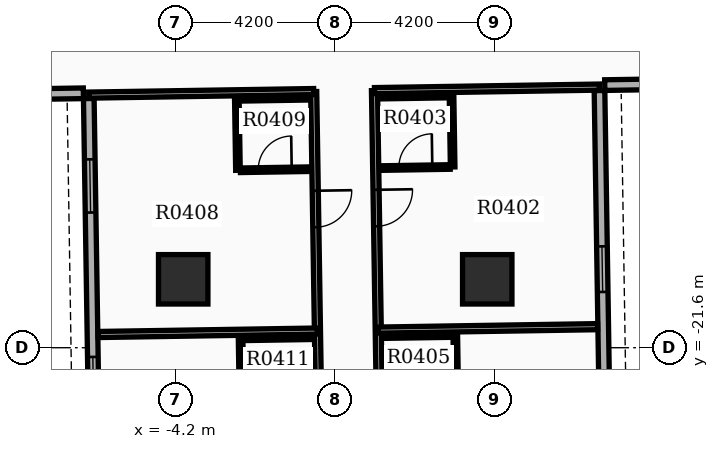
"""IFC4 building model, lengths in metres.
Left out: names, types, materials, properties, quantities, classifications, styles, units other than length and angle.
Written with IfcOpenShell. Run it as: python <this file> out.ifc"""

import sys

from ifc_helpers import new_model, si_unit, direction, frame, frame_2d, origin, origin_2d, place, context, subcontext, project, spatial, rectangle, extrude, element, fill, save


model = new_model("IFC4")
c1 = context("Model", 3, precision=1e-05, world=origin(), true_north=direction((0.0, 1.0)))
c2 = subcontext(c1, "Body", "Model", "MODEL_VIEW")
j1 = project(units=[si_unit("LENGTHUNIT", "METRE"), si_unit("PLANEANGLEUNIT", "RADIAN")], contexts=[c1])
p1 = place(None, origin())
s1 = spatial("IfcSite", under=j1, at=p1, CompositionType="ELEMENT")
p2 = place(p1, origin())
s2 = spatial("IfcBuilding", under=s1, at=p2, CompositionType="ELEMENT")
p3 = place(p2, frame((0.0, 0.0, 27.6)))
s3 = spatial("IfcBuildingStorey", under=s2, at=p3, CompositionType="ELEMENT", Elevation=27.6)
for number, where, z_axis, x_axis in (
    (1, (-4.0, -19.8, 0.0), (0.0, 0.0, 1.0), (1.0, 0.0, 0.0)),
    (2, (4.0, -19.8, 0.0), (0.0, 0.0, 1.0), (1.0, 0.0, 0.0)),
):
    element("IfcColumn", number, at=place(p3, frame(where, z_axis=z_axis, x_axis=x_axis)), inside=s3, PredefinedType="COLUMN", context=c2, shape_type="SweptSolid", body=[
        extrude(rectangle(XDim=1.3, YDim=1.3, at=origin_2d()), origin(), (0.0, 0.0, 1.0), 3.9),
    ])
p4 = place(p3, frame((-6.485, -15.044, 0.0), z_axis=(0.0, 0.0, 1.0), x_axis=(0.01571739401, -0.999876474133, 0.0)))
e3 = element("IfcWall", 3, at=p4, inside=s3, PredefinedType="STANDARD", context=c2, shape_type="SweptSolid", body=[
    extrude(rectangle(XDim=20.1, YDim=0.28, at=frame_2d((10.05, 0.0))), origin(), (0.0, 0.0, 1.0), 2.91),
])
p5 = place(p4, frame((1.6, 0.0, 0.8)))
e4 = element("IfcOpeningElement", 4, at=p5, cuts=e3, PredefinedType="OPENING", context=c2, shape_type="SweptSolid", body=[
    extrude(rectangle(XDim=1.4, YDim=1.6, at=frame_2d((0.7, 0.8))), frame((0.0, 0.15, 0.0), z_axis=(0.0, -1.0, 0.0), x_axis=(1.0, 0.0, 0.0)), (0.0, 0.0, 1.0), 0.3),
])
p6 = place(p4, frame((6.8, 0.0, 0.8)))
e5 = element("IfcOpeningElement", 5, at=p6, cuts=e3, PredefinedType="OPENING", context=c2, shape_type="SweptSolid", body=[
    extrude(rectangle(XDim=1.4, YDim=1.6, at=frame_2d((0.7, 0.8))), frame((0.0, 0.15, 0.0), z_axis=(0.0, -1.0, 0.0), x_axis=(1.0, 0.0, 0.0)), (0.0, 0.0, 1.0), 0.3),
])
p7 = place(p4, frame((10.0, 0.0, 0.8)))
e6 = element("IfcOpeningElement", 6, at=p7, cuts=e3, PredefinedType="OPENING", context=c2, shape_type="SweptSolid", body=[
    extrude(rectangle(XDim=1.4, YDim=1.6, at=frame_2d((0.7, 0.8))), frame((0.0, 0.15, 0.0), z_axis=(0.0, -1.0, 0.0), x_axis=(1.0, 0.0, 0.0)), (0.0, 0.0, 1.0), 0.3),
])
p8 = place(p4, frame((13.95, 0.0, 0.8)))
e7 = element("IfcOpeningElement", 7, at=p8, cuts=e3, PredefinedType="OPENING", context=c2, shape_type="SweptSolid", body=[
    extrude(rectangle(XDim=1.4, YDim=1.6, at=frame_2d((0.7, 0.8))), frame((0.0, 0.15, 0.0), z_axis=(0.0, -1.0, 0.0), x_axis=(1.0, 0.0, 0.0)), (0.0, 0.0, 1.0), 0.3),
])
p9 = place(p3, frame((7.27, -34.93, 0.0), z_axis=(0.0, 0.0, 1.0), x_axis=(-0.015705059908, 0.999876667941, 0.0)))
e8 = element("IfcWall", 8, at=p9, inside=s3, PredefinedType="STANDARD", context=c2, shape_type="SweptSolid", body=[
    extrude(rectangle(XDim=20.1, YDim=0.28, at=frame_2d((10.05, 0.0))), origin(), (0.0, 0.0, 1.0), 2.91),
])
p10 = place(p9, frame((1.6, 0.0, 0.8)))
e9 = element("IfcOpeningElement", 9, at=p10, cuts=e8, PredefinedType="OPENING", context=c2, shape_type="SweptSolid", body=[
    extrude(rectangle(XDim=1.4, YDim=1.6, at=frame_2d((0.7, 0.8))), frame((0.0, 0.15, 0.0), z_axis=(0.0, -1.0, 0.0), x_axis=(1.0, 0.0, 0.0)), (0.0, 0.0, 1.0), 0.3),
])
p11 = place(p9, frame((4.8, 0.0, 0.8)))
e10 = element("IfcOpeningElement", 10, at=p11, cuts=e8, PredefinedType="OPENING", context=c2, shape_type="SweptSolid", body=[
    extrude(rectangle(XDim=1.4, YDim=1.6, at=frame_2d((0.7, 0.8))), frame((0.0, 0.15, 0.0), z_axis=(0.0, -1.0, 0.0), x_axis=(1.0, 0.0, 0.0)), (0.0, 0.0, 1.0), 0.3),
])
p12 = place(p9, frame((8.0, 0.0, 0.8)))
e11 = element("IfcOpeningElement", 11, at=p12, cuts=e8, PredefinedType="OPENING", context=c2, shape_type="SweptSolid", body=[
    extrude(rectangle(XDim=1.4, YDim=1.6, at=frame_2d((0.7, 0.8))), frame((0.0, 0.15, 0.0), z_axis=(0.0, -1.0, 0.0), x_axis=(1.0, 0.0, 0.0)), (0.0, 0.0, 1.0), 0.3),
])
p13 = place(p9, frame((11.2, 0.0, 0.8)))
e12 = element("IfcOpeningElement", 12, at=p13, cuts=e8, PredefinedType="OPENING", context=c2, shape_type="SweptSolid", body=[
    extrude(rectangle(XDim=1.4, YDim=1.6, at=frame_2d((0.7, 0.8))), frame((0.0, 0.15, 0.0), z_axis=(0.0, -1.0, 0.0), x_axis=(1.0, 0.0, 0.0)), (0.0, 0.0, 1.0), 0.3),
])
p14 = place(p9, frame((14.799, 0.0, 0.85)))
e13 = element("IfcOpeningElement", 13, at=p14, cuts=e8, PredefinedType="OPENING", context=c2, shape_type="SweptSolid", body=[
    extrude(rectangle(XDim=1.2, YDim=1.6, at=frame_2d((0.6, 0.8))), frame((0.0, 0.15, 0.0), z_axis=(0.0, -1.0, 0.0), x_axis=(1.0, 0.0, 0.0)), (0.0, 0.0, 1.0), 0.3),
])
p15 = place(p3, frame((-12.926, -15.005, 0.0), z_axis=(0.0, 0.0, 1.0), x_axis=(0.999876823822, 0.015695132501, 0.0)))
e14 = element("IfcWall", 14, at=p15, inside=s3, PredefinedType="STANDARD", context=c2, shape_type="SweptSolid", body=[
    extrude(rectangle(XDim=6.3, YDim=0.28, at=frame_2d((3.15, 0.0))), origin(), (0.0, 0.0, 1.0), 2.91),
])
p16 = place(p3, frame((13.391, -14.592, 0.0), z_axis=(0.0, 0.0, 1.0), x_axis=(-0.999876833368, -0.015694524359, 0.0)))
e15 = element("IfcWall", 15, at=p16, inside=s3, PredefinedType="STANDARD", context=c2, shape_type="SweptSolid", body=[
    extrude(rectangle(XDim=6.3, YDim=0.28, at=frame_2d((3.15, 0.0))), origin(), (0.0, 0.0, 1.0), 2.91),
])
p17 = place(p3, frame((1.033, -14.836, 0.0), z_axis=(0.0, 0.0, 1.0), x_axis=(0.015701893165, -0.999876717676, 0.0)))
e16 = element("IfcWall", 16, at=p17, inside=s3, PredefinedType="PARTITIONING", context=c2, shape_type="SweptSolid", body=[
    extrude(rectangle(XDim=20.182, YDim=0.16, at=frame_2d((10.091, 0.0))), origin(), (0.0, 0.0, 1.0), 2.9),
])
p18 = place(p17, frame((2.61, 0.0, 0.0)))
e17 = element("IfcOpeningElement", 17, at=p18, cuts=e16, PredefinedType="OPENING", context=c2, shape_type="SweptSolid", body=[
    extrude(rectangle(XDim=0.96, YDim=2.15, at=frame_2d((0.48, 1.075))), frame((0.0, 0.09, 0.0), z_axis=(0.0, -1.0, 0.0), x_axis=(1.0, 0.0, 0.0)), (0.0, 0.0, 1.0), 0.18),
])
p19 = place(p17, frame((8.994, 0.0, 0.0)))
e18 = element("IfcOpeningElement", 18, at=p19, cuts=e16, PredefinedType="OPENING", context=c2, shape_type="SweptSolid", body=[
    extrude(rectangle(XDim=0.96, YDim=2.15, at=frame_2d((0.48, 1.075))), frame((0.0, 0.09, 0.0), z_axis=(0.0, -1.0, 0.0), x_axis=(1.0, 0.0, 0.0)), (0.0, 0.0, 1.0), 0.18),
])
p20 = place(p17, frame((18.93, 0.0, 0.0)))
e19 = element("IfcOpeningElement", 19, at=p20, cuts=e16, PredefinedType="OPENING", context=c2, shape_type="SweptSolid", body=[
    extrude(rectangle(XDim=0.96, YDim=2.15, at=frame_2d((0.48, 1.075))), frame((0.0, 0.09, 0.0), z_axis=(0.0, -1.0, 0.0), x_axis=(1.0, 0.0, 0.0)), (0.0, 0.0, 1.0), 0.18),
])
p21 = place(p3, frame((1.033, -14.836, 0.0), z_axis=(0.0, 0.0, 1.0), x_axis=(0.999876548847, 0.015712640343, 0.0)))
e20 = element("IfcWall", 20, at=p21, inside=s3, PredefinedType="PARTITIONING", context=c2, shape_type="SweptSolid", body=[
    extrude(rectangle(XDim=5.92, YDim=0.16, at=frame_2d((2.96, 0.0))), origin(), (0.0, 0.0, 1.0), 2.9),
])
p22 = place(p3, frame((1.132, -21.137, 0.0), z_axis=(0.0, 0.0, 1.0), x_axis=(0.999876865599, 0.015692470796, 0.0)))
e21 = element("IfcWall", 21, at=p22, inside=s3, PredefinedType="PARTITIONING", context=c2, shape_type="SweptSolid", body=[
    extrude(rectangle(XDim=5.772, YDim=0.16, at=frame_2d((2.886, 0.0))), origin(), (0.0, 0.0, 1.0), 2.9),
])
p23 = place(p3, frame((1.205, -16.873, 0.0), z_axis=(0.0, 0.0, 1.0), x_axis=(0.999874722342, 0.015828443418, 0.0)))
e22 = element("IfcWall", 22, at=p23, inside=s3, PredefinedType="PARTITIONING", context=c2, shape_type="SweptSolid", body=[
    extrude(rectangle(XDim=1.82, YDim=0.12, at=frame_2d((0.91, 0.0))), origin(), (0.0, 0.0, 1.0), 2.9),
])
p24 = place(p23, frame((0.47, 0.0, 0.0)))
e23 = element("IfcOpeningElement", 23, at=p24, cuts=e22, PredefinedType="OPENING", context=c2, shape_type="SweptSolid", body=[
    extrude(rectangle(XDim=0.88, YDim=2.1, at=frame_2d((0.44, 1.05))), frame((0.0, 0.07, 0.0), z_axis=(0.0, -1.0, 0.0), x_axis=(1.0, 0.0, 0.0)), (0.0, 0.0, 1.0), 0.14),
])
p25 = place(p3, frame((1.176, -14.993, 0.0), z_axis=(0.0, 0.0, 1.0), x_axis=(0.999876803258, 0.015696442504, 0.0)))
e24 = element("IfcWall", 24, at=p25, inside=s3, PredefinedType="PARTITIONING", context=c2, shape_type="SweptSolid", body=[
    extrude(rectangle(XDim=1.82, YDim=0.12, at=frame_2d((0.91, 0.0))), origin(), (0.0, 0.0, 1.0), 2.9),
])
p26 = place(p3, frame((3.06, -14.964, 0.0), z_axis=(0.0, 0.0, 1.0), x_axis=(0.015714386166, -0.99987652141, 0.0)))
e25 = element("IfcWall", 25, at=p26, inside=s3, PredefinedType="PARTITIONING", context=c2, shape_type="SweptSolid", body=[
    extrude(rectangle(XDim=1.88, YDim=0.12, at=frame_2d((0.94, 0.0))), origin(), (0.0, 0.0, 1.0), 2.9),
])
p27 = place(p3, frame((1.275, -21.295, 0.0), z_axis=(0.0, 0.0, 1.0), x_axis=(0.999876836305, 0.015694337248, 0.0)))
e26 = element("IfcWall", 26, at=p27, inside=s3, PredefinedType="PARTITIONING", context=c2, shape_type="SweptSolid", body=[
    extrude(rectangle(XDim=1.82, YDim=0.12, at=frame_2d((0.91, 0.0))), origin(), (0.0, 0.0, 1.0), 2.9),
])
p28 = place(p3, frame((3.159, -21.265, 0.0), z_axis=(0.0, 0.0, 1.0), x_axis=(0.01571234584, -0.999876553475, 0.0)))
e27 = element("IfcWall", 27, at=p28, inside=s3, PredefinedType="PARTITIONING", context=c2, shape_type="SweptSolid", body=[
    extrude(rectangle(XDim=1.88, YDim=0.12, at=frame_2d((0.94, 0.0))), origin(), (0.0, 0.0, 1.0), 2.9),
])
p29 = place(p3, frame((-0.567, -14.861, 0.0), z_axis=(0.0, 0.0, 1.0), x_axis=(0.015713797103, -0.999876530668, 0.0)))
e28 = element("IfcWall", 28, at=p29, inside=s3, PredefinedType="PARTITIONING", context=c2, shape_type="SweptSolid", body=[
    extrude(rectangle(XDim=20.182, YDim=0.16, at=frame_2d((10.091, 0.0))), origin(), (0.0, 0.0, 1.0), 2.9),
])
p30 = place(p29, frame((2.61, 0.0, 0.0)))
e29 = element("IfcOpeningElement", 29, at=p30, cuts=e28, PredefinedType="OPENING", context=c2, shape_type="SweptSolid", body=[
    extrude(rectangle(XDim=0.96, YDim=2.15, at=frame_2d((0.48, 1.075))), frame((0.0, 0.09, 0.0), z_axis=(0.0, -1.0, 0.0), x_axis=(1.0, 0.0, 0.0)), (0.0, 0.0, 1.0), 0.18),
])
p31 = place(p29, frame((8.994, 0.0, 0.0)))
e30 = element("IfcOpeningElement", 30, at=p31, cuts=e28, PredefinedType="OPENING", context=c2, shape_type="SweptSolid", body=[
    extrude(rectangle(XDim=0.96, YDim=2.15, at=frame_2d((0.48, 1.075))), frame((0.0, 0.09, 0.0), z_axis=(0.0, -1.0, 0.0), x_axis=(1.0, 0.0, 0.0)), (0.0, 0.0, 1.0), 0.18),
])
p32 = place(p29, frame((18.93, 0.0, 0.0)))
e31 = element("IfcOpeningElement", 31, at=p32, cuts=e28, PredefinedType="OPENING", context=c2, shape_type="SweptSolid", body=[
    extrude(rectangle(XDim=0.96, YDim=2.15, at=frame_2d((0.48, 1.075))), frame((0.0, 0.09, 0.0), z_axis=(0.0, -1.0, 0.0), x_axis=(1.0, 0.0, 0.0)), (0.0, 0.0, 1.0), 0.18),
])
p33 = place(p3, frame((-0.567, -14.861, 0.0), z_axis=(0.0, 0.0, 1.0), x_axis=(-0.999876548847, -0.015712640343, 0.0)))
e32 = element("IfcWall", 32, at=p33, inside=s3, PredefinedType="PARTITIONING", context=c2, shape_type="SweptSolid", body=[
    extrude(rectangle(XDim=5.92, YDim=0.16, at=frame_2d((2.96, 0.0))), origin(), (0.0, 0.0, 1.0), 2.9),
])
p34 = place(p3, frame((-0.468, -21.162, 0.0), z_axis=(0.0, 0.0, 1.0), x_axis=(-0.999876865599, -0.015692470796, 0.0)))
e33 = element("IfcWall", 33, at=p34, inside=s3, PredefinedType="PARTITIONING", context=c2, shape_type="SweptSolid", body=[
    extrude(rectangle(XDim=5.772, YDim=0.16, at=frame_2d((2.886, 0.0))), origin(), (0.0, 0.0, 1.0), 2.9),
])
p35 = place(p3, frame((-2.494, -16.931, 0.0), z_axis=(0.0, 0.0, 1.0), x_axis=(0.999874722342, 0.015828443418, 0.0)))
e34 = element("IfcWall", 34, at=p35, inside=s3, PredefinedType="PARTITIONING", context=c2, shape_type="SweptSolid", body=[
    extrude(rectangle(XDim=1.82, YDim=0.12, at=frame_2d((0.91, 0.0))), origin(), (0.0, 0.0, 1.0), 2.9),
])
p36 = place(p35, frame((0.47, 0.0, 0.0)))
e35 = element("IfcOpeningElement", 35, at=p36, cuts=e34, PredefinedType="OPENING", context=c2, shape_type="SweptSolid", body=[
    extrude(rectangle(XDim=0.88, YDim=2.1, at=frame_2d((0.44, 1.05))), frame((0.0, 0.07, 0.0), z_axis=(0.0, -1.0, 0.0), x_axis=(1.0, 0.0, 0.0)), (0.0, 0.0, 1.0), 0.14),
])
p37 = place(p3, frame((-2.524, -15.052, 0.0), z_axis=(0.0, 0.0, 1.0), x_axis=(0.999876836305, 0.015694337248, 0.0)))
e36 = element("IfcWall", 36, at=p37, inside=s3, PredefinedType="PARTITIONING", context=c2, shape_type="SweptSolid", body=[
    extrude(rectangle(XDim=1.82, YDim=0.12, at=frame_2d((0.91, 0.0))), origin(), (0.0, 0.0, 1.0), 2.9),
])
p38 = place(p3, frame((-2.589, -15.052, 0.0), z_axis=(0.0, 0.0, 1.0), x_axis=(0.01571234584, -0.999876553475, 0.0)))
e37 = element("IfcWall", 37, at=p38, inside=s3, PredefinedType="PARTITIONING", context=c2, shape_type="SweptSolid", body=[
    extrude(rectangle(XDim=1.88, YDim=0.12, at=frame_2d((0.94, 0.0))), origin(), (0.0, 0.0, 1.0), 2.9),
])
p39 = place(p3, frame((-2.425, -21.353, 0.0), z_axis=(0.0, 0.0, 1.0), x_axis=(0.999876836305, 0.015694337248, 0.0)))
e38 = element("IfcWall", 38, at=p39, inside=s3, PredefinedType="PARTITIONING", context=c2, shape_type="SweptSolid", body=[
    extrude(rectangle(XDim=1.82, YDim=0.12, at=frame_2d((0.91, 0.0))), origin(), (0.0, 0.0, 1.0), 2.9),
])
p40 = place(p3, frame((-2.49, -21.354, 0.0), z_axis=(0.0, 0.0, 1.0), x_axis=(0.015714386166, -0.99987652141, 0.0)))
e39 = element("IfcWall", 39, at=p40, inside=s3, PredefinedType="PARTITIONING", context=c2, shape_type="SweptSolid", body=[
    extrude(rectangle(XDim=1.88, YDim=0.12, at=frame_2d((0.94, 0.0))), origin(), (0.0, 0.0, 1.0), 2.9),
])
p41 = place(p5, origin())
e40 = element("IfcWindow", 40, at=p41, inside=s3, PartitioningType="SINGLE_PANEL", PredefinedType="WINDOW", context=c2, shape_type="SweptSolid", body=[
    extrude(rectangle(XDim=1.4, YDim=1.6, at=frame_2d((0.7, 0.8))), frame((0.0, 0.03, 0.0), z_axis=(0.0, -1.0, 0.0), x_axis=(1.0, 0.0, 0.0)), (0.0, 0.0, 1.0), 0.06),
])
fill(e4, e40)
p42 = place(p6, origin())
e41 = element("IfcWindow", 41, at=p42, inside=s3, PartitioningType="SINGLE_PANEL", PredefinedType="WINDOW", context=c2, shape_type="SweptSolid", body=[
    extrude(rectangle(XDim=1.4, YDim=1.6, at=frame_2d((0.7, 0.8))), frame((0.0, 0.03, 0.0), z_axis=(0.0, -1.0, 0.0), x_axis=(1.0, 0.0, 0.0)), (0.0, 0.0, 1.0), 0.06),
])
fill(e5, e41)
p43 = place(p14, origin())
e42 = element("IfcWindow", 42, at=p43, inside=s3, PartitioningType="SINGLE_PANEL", PredefinedType="WINDOW", context=c2, shape_type="SweptSolid", body=[
    extrude(rectangle(XDim=1.2, YDim=1.6, at=frame_2d((0.6, 0.8))), frame((0.0, 0.03, 0.0), z_axis=(0.0, -1.0, 0.0), x_axis=(1.0, 0.0, 0.0)), (0.0, 0.0, 1.0), 0.06),
])
fill(e13, e42)
p44 = place(p18, origin())
e43 = element("IfcDoor", 43, at=p44, inside=s3, OperationType="SINGLE_SWING_LEFT", PredefinedType="DOOR", context=c2, shape_type="SweptSolid", body=[
    extrude(rectangle(XDim=0.96, YDim=2.15, at=frame_2d((0.48, 1.075))), frame((0.0, 0.025, 0.0), z_axis=(0.0, -1.0, 0.0), x_axis=(1.0, 0.0, 0.0)), (0.0, 0.0, 1.0), 0.05),
])
fill(e17, e43)
p45 = place(p24, origin())
e44 = element("IfcDoor", 44, at=p45, inside=s3, OperationType="SINGLE_SWING_RIGHT", PredefinedType="DOOR", context=c2, shape_type="SweptSolid", body=[
    extrude(rectangle(XDim=0.88, YDim=2.1, at=frame_2d((0.44, 1.05))), frame((0.0, 0.025, 0.0), z_axis=(0.0, -1.0, 0.0), x_axis=(1.0, 0.0, 0.0)), (0.0, 0.0, 1.0), 0.05),
])
fill(e23, e44)
p46 = place(p30, origin())
e45 = element("IfcDoor", 45, at=p46, inside=s3, OperationType="SINGLE_SWING_LEFT", PredefinedType="DOOR", context=c2, shape_type="SweptSolid", body=[
    extrude(rectangle(XDim=0.96, YDim=2.15, at=frame_2d((0.48, 1.075))), frame((0.0, 0.025, 0.0), z_axis=(0.0, -1.0, 0.0), x_axis=(1.0, 0.0, 0.0)), (0.0, 0.0, 1.0), 0.05),
])
fill(e29, e45)
p47 = place(p36, origin())
e46 = element("IfcDoor", 46, at=p47, inside=s3, OperationType="SINGLE_SWING_RIGHT", PredefinedType="DOOR", context=c2, shape_type="SweptSolid", body=[
    extrude(rectangle(XDim=0.88, YDim=2.1, at=frame_2d((0.44, 1.05))), frame((0.0, 0.025, 0.0), z_axis=(0.0, -1.0, 0.0), x_axis=(1.0, 0.0, 0.0)), (0.0, 0.0, 1.0), 0.05),
])
fill(e35, e46)
save(model, sys.argv[1])
